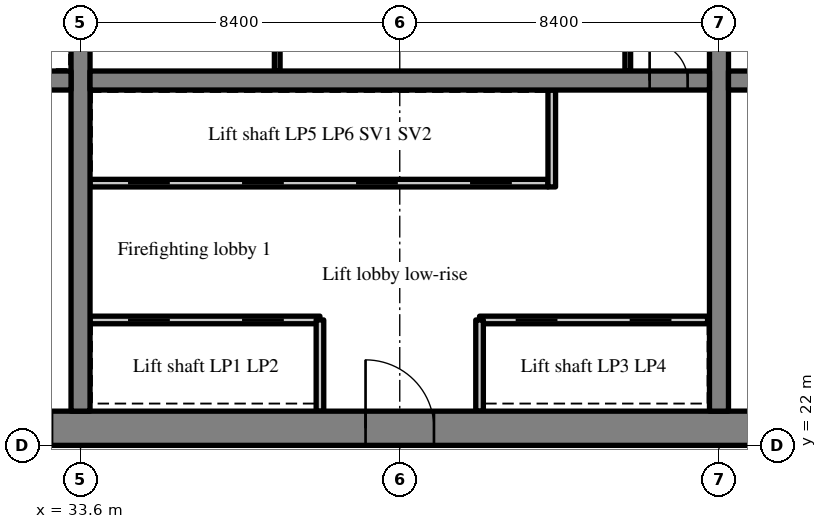
"""IFC4 building model, lengths in metres.
Left out: names, types, materials, properties, quantities, classifications, styles, units other than length and angle.
Written with IfcOpenShell. Run it as: python <this file> out.ifc"""

import sys

from ifc_helpers import new_model, si_unit, direction, frame, frame_2d, origin, place, context, subcontext, project, spatial, rectangle, extrude, source, transform, mapped, element, fill, save


model = new_model("IFC4")
c1 = context("Model", 3, precision=1e-05, world=origin(), true_north=direction((0.0, 1.0)))
c2 = subcontext(c1, "Body", "Model", "MODEL_VIEW")
j1 = project(units=[si_unit("LENGTHUNIT", "METRE"), si_unit("PLANEANGLEUNIT", "RADIAN")], contexts=[c1])
p1 = place(None, origin())
s1 = spatial("IfcSite", under=j1, at=p1, CompositionType="ELEMENT")
p2 = place(p1, origin())
s2 = spatial("IfcBuilding", under=s1, at=p2, CompositionType="ELEMENT")
p3 = place(p2, frame((0.0, 0.0, 95.2)))
s3 = spatial("IfcBuildingStorey", under=s2, at=p3, CompositionType="ELEMENT", Elevation=95.2)
m1 = source(origin(), c2, "Body", "SweptSolid", [
    extrude(rectangle(XDim=50.4, YDim=0.9, at=frame_2d((25.2, 0.0))), origin(), (0.0, 0.0, 1.0), 3.52),
])
p4 = place(p3, frame((25.2, 22.45, 0.0), z_axis=(0.0, 0.0, 1.0), x_axis=(1.0, 0.0, 0.0)))
e1 = element("IfcWall", 1, at=p4, inside=s3, PredefinedType="SHEAR", context=c2, shape_type="MappedRepresentation", body=[
    mapped(m1, transform((0.0, 0.0, 0.0), scale=1.0)),
])
m2 = source(origin(), c2, "Body", "SweptSolid", [
    extrude(rectangle(XDim=1.8, YDim=2.1, at=frame_2d((0.9, 1.05))), frame((0.0, 0.46, 0.0), z_axis=(0.0, -1.0, 0.0), x_axis=(1.0, 0.0, 0.0)), (0.0, 0.0, 1.0), 0.92),
])
p5 = place(p4, frame((15.9, 0.0, 0.0)))
e2 = element("IfcOpeningElement", 2, at=p5, cuts=e1, PredefinedType="OPENING", context=c2, shape_type="MappedRepresentation", body=[
    mapped(m2, transform((0.0, 0.0, 0.0), scale=1.0)),
])
m3 = source(origin(), c2, "Body", "SweptSolid", [
    extrude(rectangle(XDim=1.2, YDim=2.1, at=frame_2d((0.6, 1.05))), frame((0.0, 0.46, 0.0), z_axis=(0.0, -1.0, 0.0), x_axis=(1.0, 0.0, 0.0)), (0.0, 0.0, 1.0), 0.92),
])
p6 = place(p4, frame((26.975, 0.0, 0.0)))
e3 = element("IfcOpeningElement", 3, at=p6, cuts=e1, PredefinedType="OPENING", context=c2, shape_type="MappedRepresentation", body=[
    mapped(m3, transform((0.0, 0.0, 0.0), scale=1.0)),
])
m4 = source(origin(), c2, "Body", "SweptSolid", [
    extrude(rectangle(XDim=0.9, YDim=2.1, at=frame_2d((0.45, 1.05))), frame((0.0, 0.46, 0.0), z_axis=(0.0, -1.0, 0.0), x_axis=(1.0, 0.0, 0.0)), (0.0, 0.0, 1.0), 0.92),
])
p7 = place(p4, frame((34.5, 0.0, 0.0)))
e4 = element("IfcOpeningElement", 4, at=p7, cuts=e1, PredefinedType="OPENING", context=c2, shape_type="MappedRepresentation", body=[
    mapped(m4, transform((0.0, 0.0, 0.0), scale=1.0)),
])
p8 = place(p4, frame((31.5, 0.0, 0.0)))
e5 = element("IfcOpeningElement", 5, at=p8, cuts=e1, PredefinedType="OPENING", context=c2, shape_type="MappedRepresentation", body=[
    mapped(m4, transform((0.0, 0.0, 0.0), scale=1.0)),
])
p9 = place(p4, frame((39.788, 0.0, 0.0)))
e6 = element("IfcOpeningElement", 6, at=p9, cuts=e1, PredefinedType="OPENING", context=c2, shape_type="MappedRepresentation", body=[
    mapped(m4, transform((0.0, 0.0, 0.0), scale=1.0)),
])
p10 = place(p4, frame((36.762, 0.0, 0.0)))
e7 = element("IfcOpeningElement", 7, at=p10, cuts=e1, PredefinedType="OPENING", context=c2, shape_type="MappedRepresentation", body=[
    mapped(m4, transform((0.0, 0.0, 0.0), scale=1.0)),
])
p11 = place(p4, frame((6.45, 0.0, 0.0)))
e8 = element("IfcOpeningElement", 8, at=p11, cuts=e1, PredefinedType="OPENING", context=c2, shape_type="MappedRepresentation", body=[
    mapped(m3, transform((0.0, 0.0, 0.0), scale=1.0)),
])
p12 = place(p4, frame((47.775, 0.0, 0.0)))
e9 = element("IfcOpeningElement", 9, at=p12, cuts=e1, PredefinedType="OPENING", context=c2, shape_type="MappedRepresentation", body=[
    mapped(m3, transform((0.0, 0.0, 0.0), scale=1.0)),
])
m5 = source(origin(), c2, "Body", "SweptSolid", [
    extrude(rectangle(XDim=18.2, YDim=0.5, at=frame_2d((9.1, 0.0))), origin(), (0.0, 0.0, 1.0), 3.52),
])
p13 = place(p3, frame((33.6, 22.9, 0.0), z_axis=(0.0, 0.0, 1.0), x_axis=(0.0, 1.0, 0.0)))
e10 = element("IfcWall", 10, at=p13, inside=s3, PredefinedType="SHEAR", context=c2, shape_type="MappedRepresentation", body=[
    mapped(m5, transform((0.0, 0.0, 0.0), scale=1.0)),
])
m6 = source(origin(), c2, "Body", "SweptSolid", [
    extrude(rectangle(XDim=1.1, YDim=2.1, at=frame_2d((0.55, 1.05))), frame((0.0, 0.26, 0.0), z_axis=(0.0, -1.0, 0.0), x_axis=(1.0, 0.0, 0.0)), (0.0, 0.0, 1.0), 0.52),
])
p14 = place(p13, frame((12.55, 0.0, 0.0)))
e11 = element("IfcOpeningElement", 11, at=p14, cuts=e10, PredefinedType="OPENING", context=c2, shape_type="MappedRepresentation", body=[
    mapped(m6, transform((0.0, 0.0, 0.0), scale=1.0)),
])
p15 = place(p3, frame((50.4, 22.9, 0.0), z_axis=(0.0, 0.0, 1.0), x_axis=(0.0, 1.0, 0.0)))
e12 = element("IfcWall", 12, at=p15, inside=s3, PredefinedType="SHEAR", context=c2, shape_type="MappedRepresentation", body=[
    mapped(m5, transform((0.0, 0.0, 0.0), scale=1.0)),
])
p16 = place(p15, frame((12.55, 0.0, 0.0)))
e13 = element("IfcOpeningElement", 13, at=p16, cuts=e12, PredefinedType="OPENING", context=c2, shape_type="MappedRepresentation", body=[
    mapped(m6, transform((0.0, 0.0, 0.0), scale=1.0)),
])
m7 = source(origin(), c2, "Body", "SweptSolid", [
    extrude(rectangle(XDim=7.25, YDim=0.5, at=frame_2d((3.625, 0.0))), origin(), (0.0, 0.0, 1.0), 3.52),
])
p17 = place(p3, frame((26.1, 31.6, 0.0), z_axis=(0.0, 0.0, 1.0), x_axis=(1.0, 0.0, 0.0)))
e14 = element("IfcWall", 14, at=p17, inside=s3, PredefinedType="SHEAR", context=c2, shape_type="MappedRepresentation", body=[
    mapped(m7, transform((0.0, 0.0, 0.0), scale=1.0)),
])
p18 = place(p17, frame((5.6, 0.0, 0.0)))
e15 = element("IfcOpeningElement", 15, at=p18, cuts=e14, PredefinedType="OPENING", context=c2, shape_type="MappedRepresentation", body=[
    mapped(m6, transform((0.0, 0.0, 0.0), scale=1.0)),
])
m8 = source(origin(), c2, "Body", "SweptSolid", [
    extrude(rectangle(XDim=16.3, YDim=0.5, at=frame_2d((8.15, 0.0))), origin(), (0.0, 0.0, 1.0), 3.52),
])
p19 = place(p3, frame((33.85, 31.6, 0.0), z_axis=(0.0, 0.0, 1.0), x_axis=(1.0, 0.0, 0.0)))
e16 = element("IfcWall", 16, at=p19, inside=s3, PredefinedType="SHEAR", context=c2, shape_type="MappedRepresentation", body=[
    mapped(m8, transform((0.0, 0.0, 0.0), scale=1.0)),
])
m9 = source(origin(), c2, "Body", "SweptSolid", [
    extrude(rectangle(XDim=1.0, YDim=2.1, at=frame_2d((0.5, 1.05))), frame((0.0, 0.26, 0.0), z_axis=(0.0, -1.0, 0.0), x_axis=(1.0, 0.0, 0.0)), (0.0, 0.0, 1.0), 0.52),
])
p20 = place(p19, frame((14.725, 0.0, 0.0)))
e17 = element("IfcOpeningElement", 17, at=p20, cuts=e16, PredefinedType="OPENING", context=c2, shape_type="MappedRepresentation", body=[
    mapped(m9, transform((0.0, 0.0, 0.0), scale=1.0)),
])
m10 = source(origin(), c2, "Body", "SweptSolid", [
    extrude(rectangle(XDim=16.3, YDim=0.5, at=frame_2d((8.15, 0.0))), origin(), (0.0, 0.0, 1.0), 3.52),
])
p21 = place(p3, frame((50.65, 31.6, 0.0), z_axis=(0.0, 0.0, 1.0), x_axis=(1.0, 0.0, 0.0)))
e18 = element("IfcWall", 18, at=p21, inside=s3, PredefinedType="SHEAR", context=c2, shape_type="MappedRepresentation", body=[
    mapped(m10, transform((0.0, 0.0, 0.0), scale=1.0)),
])
p22 = place(p21, frame((0.575, 0.0, 0.0)))
e19 = element("IfcOpeningElement", 19, at=p22, cuts=e18, PredefinedType="OPENING", context=c2, shape_type="MappedRepresentation", body=[
    mapped(m9, transform((0.0, 0.0, 0.0), scale=1.0)),
])
m11 = source(origin(), c2, "Body", "SweptSolid", [
    extrude(rectangle(XDim=6.05, YDim=0.2, at=frame_2d((3.025, 0.0))), origin(), (0.0, 0.0, 1.0), 3.52),
])
p23 = place(p3, frame((33.85, 25.3, 0.0), z_axis=(0.0, 0.0, 1.0), x_axis=(1.0, 0.0, 0.0)))
e20 = element("IfcWall", 20, at=p23, inside=s3, PredefinedType="SOLIDWALL", context=c2, shape_type="MappedRepresentation", body=[
    mapped(m11, transform((0.0, 0.0, 0.0), scale=1.0)),
])
m12 = source(origin(), c2, "Body", "SweptSolid", [
    extrude(rectangle(XDim=1.1, YDim=2.1, at=frame_2d((0.55, 1.05))), frame((0.0, 0.11, 0.0), z_axis=(0.0, -1.0, 0.0), x_axis=(1.0, 0.0, 0.0)), (0.0, 0.0, 1.0), 0.22),
])
p24 = place(p23, frame((1.0, 0.0, 0.0)))
e21 = element("IfcOpeningElement", 21, at=p24, cuts=e20, PredefinedType="OPENING", context=c2, shape_type="MappedRepresentation", body=[
    mapped(m12, transform((0.0, 0.0, 0.0), scale=1.0)),
])
p25 = place(p23, frame((4.0, 0.0, 0.0)))
e22 = element("IfcOpeningElement", 22, at=p25, cuts=e20, PredefinedType="OPENING", context=c2, shape_type="MappedRepresentation", body=[
    mapped(m12, transform((0.0, 0.0, 0.0), scale=1.0)),
])
m13 = source(origin(), c2, "Body", "SweptSolid", [
    extrude(rectangle(XDim=6.0, YDim=0.2, at=frame_2d((3.0, 0.0))), origin(), (0.0, 0.0, 1.0), 3.52),
])
p26 = place(p3, frame((44.1, 25.3, 0.0), z_axis=(0.0, 0.0, 1.0), x_axis=(1.0, 0.0, 0.0)))
e23 = element("IfcWall", 23, at=p26, inside=s3, PredefinedType="SOLIDWALL", context=c2, shape_type="MappedRepresentation", body=[
    mapped(m13, transform((0.0, 0.0, 0.0), scale=1.0)),
])
p27 = place(p26, frame((0.95, 0.0, 0.0)))
e24 = element("IfcOpeningElement", 24, at=p27, cuts=e23, PredefinedType="OPENING", context=c2, shape_type="MappedRepresentation", body=[
    mapped(m12, transform((0.0, 0.0, 0.0), scale=1.0)),
])
p28 = place(p26, frame((3.95, 0.0, 0.0)))
e25 = element("IfcOpeningElement", 25, at=p28, cuts=e23, PredefinedType="OPENING", context=c2, shape_type="MappedRepresentation", body=[
    mapped(m12, transform((0.0, 0.0, 0.0), scale=1.0)),
])
m14 = source(origin(), c2, "Body", "SweptSolid", [
    extrude(rectangle(XDim=12.05, YDim=0.2, at=frame_2d((6.025, 0.0))), origin(), (0.0, 0.0, 1.0), 3.52),
])
p29 = place(p3, frame((33.85, 28.9, 0.0), z_axis=(0.0, 0.0, 1.0), x_axis=(1.0, 0.0, 0.0)))
e26 = element("IfcWall", 26, at=p29, inside=s3, PredefinedType="SOLIDWALL", context=c2, shape_type="MappedRepresentation", body=[
    mapped(m14, transform((0.0, 0.0, 0.0), scale=1.0)),
])
p30 = place(p29, frame((1.0, 0.0, 0.0)))
e27 = element("IfcOpeningElement", 27, at=p30, cuts=e26, PredefinedType="OPENING", context=c2, shape_type="MappedRepresentation", body=[
    mapped(m12, transform((0.0, 0.0, 0.0), scale=1.0)),
])
p31 = place(p29, frame((4.0, 0.0, 0.0)))
e28 = element("IfcOpeningElement", 28, at=p31, cuts=e26, PredefinedType="OPENING", context=c2, shape_type="MappedRepresentation", body=[
    mapped(m12, transform((0.0, 0.0, 0.0), scale=1.0)),
])
p32 = place(p29, frame((7.0, 0.0, 0.0)))
e29 = element("IfcOpeningElement", 29, at=p32, cuts=e26, PredefinedType="OPENING", context=c2, shape_type="MappedRepresentation", body=[
    mapped(m12, transform((0.0, 0.0, 0.0), scale=1.0)),
])
p33 = place(p29, frame((10.0, 0.0, 0.0)))
e30 = element("IfcOpeningElement", 30, at=p33, cuts=e26, PredefinedType="OPENING", context=c2, shape_type="MappedRepresentation", body=[
    mapped(m12, transform((0.0, 0.0, 0.0), scale=1.0)),
])
m15 = source(origin(), c2, "Body", "SweptSolid", [
    extrude(rectangle(XDim=2.4, YDim=0.2, at=frame_2d((1.2, 0.0))), origin(), (0.0, 0.0, 1.0), 3.52),
])
for number, where, z_axis, x_axis in (
    (31, (39.9, 22.9, 0.0), (0.0, 0.0, 1.0), (0.0, 1.0, 0.0)),
    (32, (44.1, 22.9, 0.0), (0.0, 0.0, 1.0), (0.0, 1.0, 0.0)),
):
    element("IfcWall", number, at=place(p3, frame(where, z_axis=z_axis, x_axis=x_axis)), inside=s3, PredefinedType="SOLIDWALL", context=c2, shape_type="MappedRepresentation", body=[
        mapped(m15, transform((0.0, 0.0, 0.0), scale=1.0)),
    ])
m16 = source(origin(), c2, "Body", "SweptSolid", [
    extrude(rectangle(XDim=2.55, YDim=0.2, at=frame_2d((1.275, 0.0))), origin(), (0.0, 0.0, 1.0), 3.52),
])
p34 = place(p3, frame((46.0, 28.8, 0.0), z_axis=(0.0, 0.0, 1.0), x_axis=(0.0, 1.0, 0.0)))
e33 = element("IfcWall", 33, at=p34, inside=s3, PredefinedType="SOLIDWALL", context=c2, shape_type="MappedRepresentation", body=[
    mapped(m16, transform((0.0, 0.0, 0.0), scale=1.0)),
])
m17 = source(origin(), c2, "Body", "SweptSolid", [
    extrude(rectangle(XDim=3.15, YDim=0.15, at=frame_2d((1.575, 0.0))), origin(), (0.0, 0.0, 1.0), 3.52),
])
for number, where, z_axis, x_axis in (
    (34, (48.0, 31.85, 0.0), (0.0, 0.0, 1.0), (0.0, 1.0, 0.0)),
    (35, (38.776, 31.85, 0.0), (0.0, 0.0, 1.0), (0.0, 1.0, 0.0)),
):
    element("IfcWall", number, at=place(p3, frame(where, z_axis=z_axis, x_axis=x_axis)), inside=s3, PredefinedType="PARTITIONING", context=c2, shape_type="MappedRepresentation", body=[
        mapped(m17, transform((0.0, 0.0, 0.0), scale=1.0)),
    ])
m18 = source(origin(), c2, "Body", "SweptSolid", [
    extrude(rectangle(XDim=1.8, YDim=2.1, at=frame_2d((0.9, 1.05))), frame((0.0, 0.375, 0.0), z_axis=(0.0, -1.0, 0.0), x_axis=(1.0, 0.0, 0.0)), (0.0, 0.0, 1.0), 0.05),
])
p35 = place(p5, origin())
e36 = element("IfcDoor", 36, at=p35, inside=s3, OperationType="DOUBLE_DOOR_SINGLE_SWING", PredefinedType="DOOR", context=c2, shape_type="MappedRepresentation", body=[
    mapped(m18, transform((0.0, 0.0, 0.0), scale=1.0)),
])
fill(e2, e36)
m19 = source(origin(), c2, "Body", "SweptSolid", [
    extrude(rectangle(XDim=1.0, YDim=2.1, at=frame_2d((0.5, 1.05))), frame((0.0, 0.025, 0.0), z_axis=(0.0, -1.0, 0.0), x_axis=(1.0, 0.0, 0.0)), (0.0, 0.0, 1.0), 0.05),
])
p36 = place(p20, origin())
e37 = element("IfcDoor", 37, at=p36, inside=s3, OperationType="SINGLE_SWING_LEFT", PredefinedType="DOOR", context=c2, shape_type="MappedRepresentation", body=[
    mapped(m19, transform((0.0, 0.0, 0.0), scale=1.0)),
])
fill(e17, e37)
m20 = source(origin(), c2, "Body", "SweptSolid", [
    extrude(rectangle(XDim=1.1, YDim=2.1, at=frame_2d((0.55, 1.05))), frame((0.0, 0.025, 0.0), z_axis=(0.0, -1.0, 0.0), x_axis=(1.0, 0.0, 0.0)), (0.0, 0.0, 1.0), 0.05),
])
p37 = place(p24, origin())
e38 = element("IfcDoor", 38, at=p37, inside=s3, OperationType="SLIDING_TO_LEFT", PredefinedType="DOOR", context=c2, shape_type="MappedRepresentation", body=[
    mapped(m20, transform((0.0, 0.0, 0.0), scale=1.0)),
])
fill(e21, e38)
p38 = place(p25, origin())
e39 = element("IfcDoor", 39, at=p38, inside=s3, OperationType="SLIDING_TO_RIGHT", PredefinedType="DOOR", context=c2, shape_type="MappedRepresentation", body=[
    mapped(m20, transform((0.0, 0.0, 0.0), scale=1.0)),
])
fill(e22, e39)
p39 = place(p27, origin())
e40 = element("IfcDoor", 40, at=p39, inside=s3, OperationType="SLIDING_TO_LEFT", PredefinedType="DOOR", context=c2, shape_type="MappedRepresentation", body=[
    mapped(m20, transform((0.0, 0.0, 0.0), scale=1.0)),
])
fill(e24, e40)
p40 = place(p28, origin())
e41 = element("IfcDoor", 41, at=p40, inside=s3, OperationType="SLIDING_TO_RIGHT", PredefinedType="DOOR", context=c2, shape_type="MappedRepresentation", body=[
    mapped(m20, transform((0.0, 0.0, 0.0), scale=1.0)),
])
fill(e25, e41)
p41 = place(p30, origin())
e42 = element("IfcDoor", 42, at=p41, inside=s3, OperationType="SLIDING_TO_LEFT", PredefinedType="DOOR", context=c2, shape_type="MappedRepresentation", body=[
    mapped(m20, transform((0.0, 0.0, 0.0), scale=1.0)),
])
fill(e27, e42)
p42 = place(p31, origin())
e43 = element("IfcDoor", 43, at=p42, inside=s3, OperationType="SLIDING_TO_RIGHT", PredefinedType="DOOR", context=c2, shape_type="MappedRepresentation", body=[
    mapped(m20, transform((0.0, 0.0, 0.0), scale=1.0)),
])
fill(e28, e43)
p43 = place(p32, origin())
e44 = element("IfcDoor", 44, at=p43, inside=s3, OperationType="SLIDING_TO_LEFT", PredefinedType="DOOR", context=c2, shape_type="MappedRepresentation", body=[
    mapped(m20, transform((0.0, 0.0, 0.0), scale=1.0)),
])
fill(e29, e44)
p44 = place(p33, origin())
e45 = element("IfcDoor", 45, at=p44, inside=s3, OperationType="SLIDING_TO_RIGHT", PredefinedType="DOOR", context=c2, shape_type="MappedRepresentation", body=[
    mapped(m20, transform((0.0, 0.0, 0.0), scale=1.0)),
])
fill(e30, e45)
save(model, sys.argv[1])
